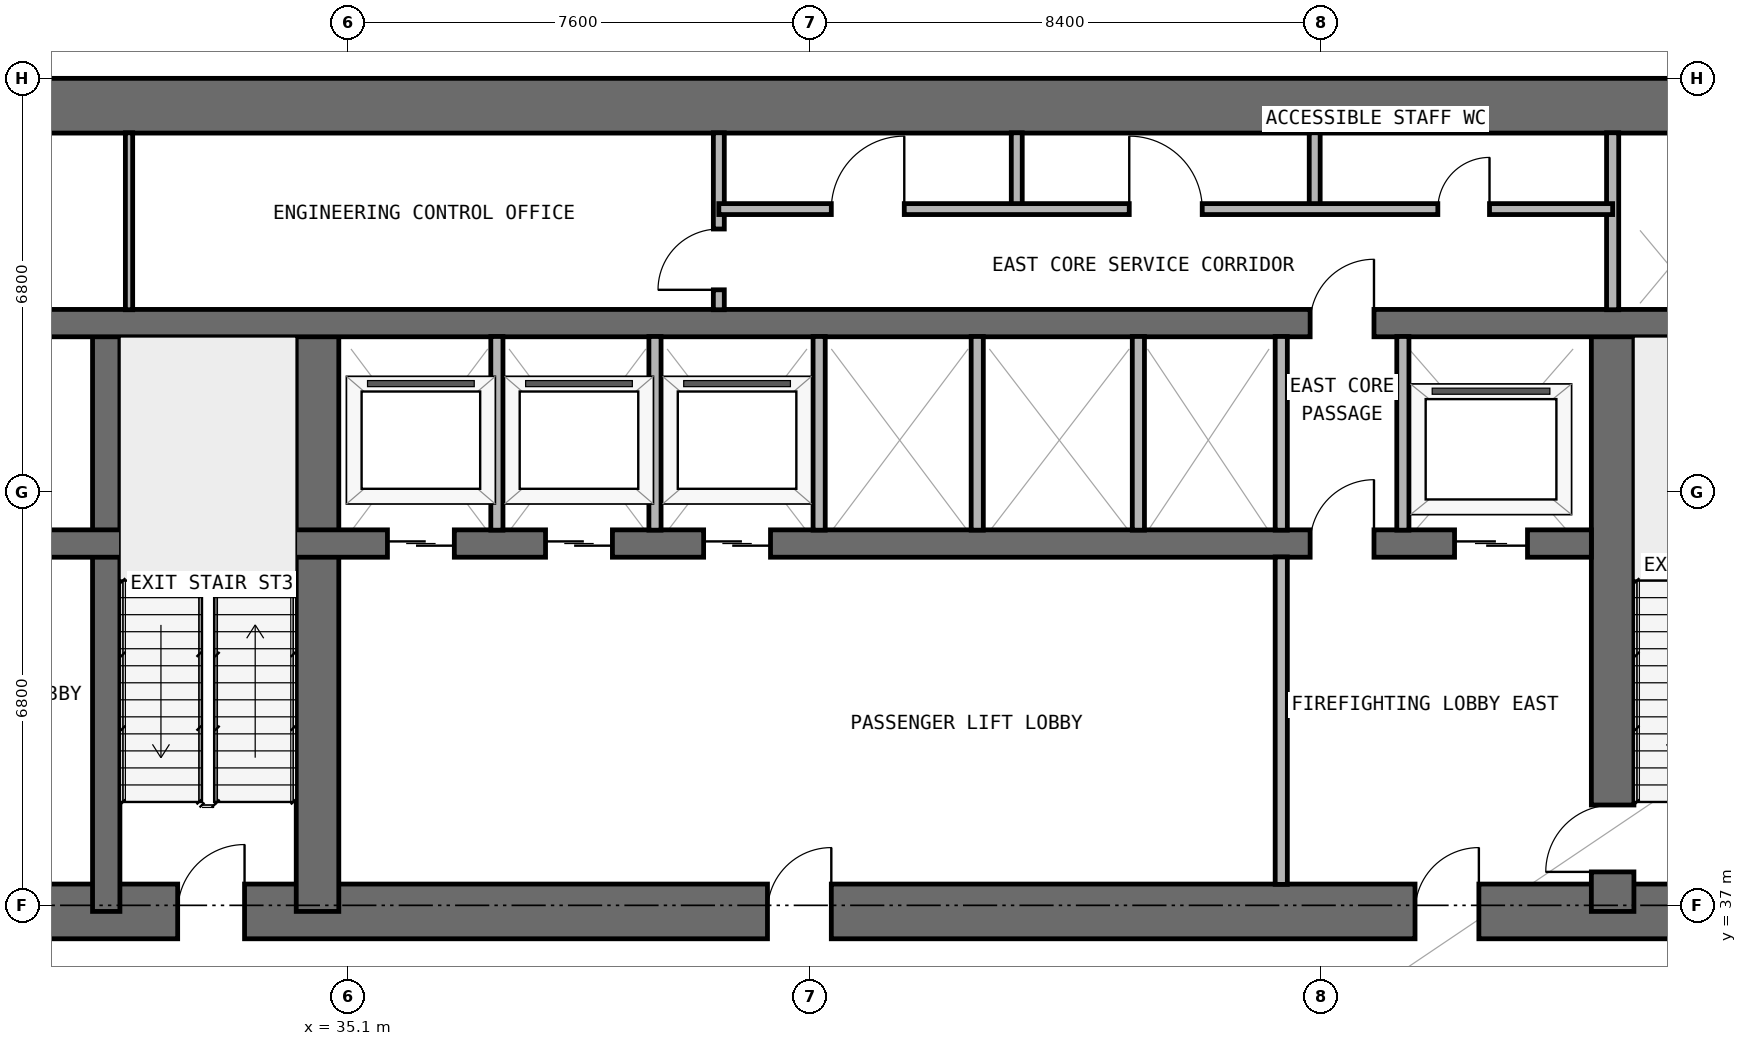
"""IFC4 building model, lengths in metres.
Left out: names, types, materials, properties, quantities, classifications, styles, units other than length and angle.
Written with IfcOpenShell. Run it as: python <this file> out.ifc"""

import sys

from ifc_helpers import new_model, si_unit, direction, frame, frame_2d, origin, place, context, subcontext, project, spatial, rectangle, extrude, element, fill, save


model = new_model("IFC4")
c1 = context("Model", 3, precision=1e-05, world=origin(), true_north=direction((0.0, 1.0)))
c2 = subcontext(c1, "Body", "Model", "MODEL_VIEW")
j1 = project(units=[si_unit("LENGTHUNIT", "METRE"), si_unit("PLANEANGLEUNIT", "RADIAN")], contexts=[c1])
p1 = place(None, origin())
s1 = spatial("IfcSite", under=j1, at=p1, CompositionType="ELEMENT")
p2 = place(p1, origin())
s2 = spatial("IfcBuilding", under=s1, at=p2, CompositionType="ELEMENT")
p3 = place(p2, frame((0.0, 0.0, 10.2)))
s3 = spatial("IfcBuildingStorey", under=s2, at=p3, CompositionType="ELEMENT", Elevation=10.2)
p4 = place(p3, frame((17.75, 36.9, 0.0), z_axis=(0.0, 0.0, 1.0), x_axis=(1.0, 0.0, 0.0)))
e1 = element("IfcWall", 1, at=p4, inside=s3, PredefinedType="SHEAR", context=c2, shape_type="SweptSolid", body=[
    extrude(rectangle(XDim=42.3, YDim=0.9, at=frame_2d((21.15, 0.0))), origin(), (0.0, 0.0, 1.0), 4.5),
])
p5 = place(p4, frame((14.55, 0.0, 0.0)))
e2 = element("IfcOpeningElement", 2, at=p5, cuts=e1, PredefinedType="OPENING", context=c2, shape_type="SweptSolid", body=[
    extrude(rectangle(XDim=1.1, YDim=2.15, at=frame_2d((0.55, 1.075))), frame((0.0, 0.46, 0.0), z_axis=(0.0, -1.0, 0.0), x_axis=(1.0, 0.0, 0.0)), (0.0, 0.0, 1.0), 0.92),
])
p6 = place(p4, frame((6.4, 0.0, 0.0)))
e3 = element("IfcOpeningElement", 3, at=p6, cuts=e1, PredefinedType="OPENING", context=c2, shape_type="SweptSolid", body=[
    extrude(rectangle(XDim=1.05, YDim=2.15, at=frame_2d((0.525, 1.075))), frame((0.0, 0.46, 0.0), z_axis=(0.0, -1.0, 0.0), x_axis=(1.0, 0.0, 0.0)), (0.0, 0.0, 1.0), 0.92),
])
p7 = place(p4, frame((34.9, 0.0, 0.0)))
e4 = element("IfcOpeningElement", 4, at=p7, cuts=e1, PredefinedType="OPENING", context=c2, shape_type="SweptSolid", body=[
    extrude(rectangle(XDim=1.05, YDim=2.15, at=frame_2d((0.525, 1.075))), frame((0.0, 0.46, 0.0), z_axis=(0.0, -1.0, 0.0), x_axis=(1.0, 0.0, 0.0)), (0.0, 0.0, 1.0), 0.92),
])
p8 = place(p4, frame((11.012, 0.0, 0.0)))
e5 = element("IfcOpeningElement", 5, at=p8, cuts=e1, PredefinedType="OPENING", context=c2, shape_type="SweptSolid", body=[
    extrude(rectangle(XDim=1.05, YDim=2.15, at=frame_2d((0.525, 1.075))), frame((0.0, 0.46, 0.0), z_axis=(0.0, -1.0, 0.0), x_axis=(1.0, 0.0, 0.0)), (0.0, 0.0, 1.0), 0.92),
])
p9 = place(p4, frame((24.25, 0.0, 0.0)))
e6 = element("IfcOpeningElement", 6, at=p9, cuts=e1, PredefinedType="OPENING", context=c2, shape_type="SweptSolid", body=[
    extrude(rectangle(XDim=1.05, YDim=2.15, at=frame_2d((0.525, 1.075))), frame((0.0, 0.46, 0.0), z_axis=(0.0, -1.0, 0.0), x_axis=(1.0, 0.0, 0.0)), (0.0, 0.0, 1.0), 0.92),
])
p10 = place(p3, frame((17.75, 50.15, 0.0), z_axis=(0.0, 0.0, 1.0), x_axis=(1.0, 0.0, 0.0)))
e7 = element("IfcWall", 7, at=p10, inside=s3, PredefinedType="SHEAR", context=c2, shape_type="SweptSolid", body=[
    extrude(rectangle(XDim=42.3, YDim=0.9, at=frame_2d((21.15, 0.0))), origin(), (0.0, 0.0, 1.0), 4.5),
])
p11 = place(p3, frame((55.9, 36.9, 0.0), z_axis=(0.0, 0.0, 1.0), x_axis=(0.0, 1.0, 0.0)))
e8 = element("IfcWall", 8, at=p11, inside=s3, PredefinedType="SHEAR", context=c2, shape_type="SweptSolid", body=[
    extrude(rectangle(XDim=9.675, YDim=0.7, at=frame_2d((4.837, 0.0))), origin(), (0.0, 0.0, 1.0), 4.5),
])
p12 = place(p11, frame((0.65, 0.0, 0.0)))
e9 = element("IfcOpeningElement", 9, at=p12, cuts=e8, PredefinedType="OPENING", context=c2, shape_type="SweptSolid", body=[
    extrude(rectangle(XDim=1.1, YDim=2.15, at=frame_2d((0.55, 1.075))), frame((0.0, 0.36, 0.0), z_axis=(0.0, -1.0, 0.0), x_axis=(1.0, 0.0, 0.0)), (0.0, 0.0, 1.0), 0.72),
])
p13 = place(p3, frame((31.125, 36.9, 0.0), z_axis=(0.0, 0.0, 1.0), x_axis=(0.0, 1.0, 0.0)))
e10 = element("IfcWall", 10, at=p13, inside=s3, PredefinedType="SHEAR", context=c2, shape_type="SweptSolid", body=[
    extrude(rectangle(XDim=9.675, YDim=0.45, at=frame_2d((4.837, 0.0))), origin(), (0.0, 0.0, 1.0), 4.5),
])
p14 = place(p3, frame((34.6, 36.9, 0.0), z_axis=(0.0, 0.0, 1.0), x_axis=(0.0, 1.0, 0.0)))
e11 = element("IfcWall", 11, at=p14, inside=s3, PredefinedType="SHEAR", context=c2, shape_type="SweptSolid", body=[
    extrude(rectangle(XDim=9.675, YDim=0.7, at=frame_2d((4.837, 0.0))), origin(), (0.0, 0.0, 1.0), 4.5),
])
p15 = place(p3, frame((22.25, 42.95, 0.0), z_axis=(0.0, 0.0, 1.0), x_axis=(1.0, 0.0, 0.0)))
e12 = element("IfcWall", 12, at=p15, inside=s3, PredefinedType="SHEAR", context=c2, shape_type="SweptSolid", body=[
    extrude(rectangle(XDim=33.3, YDim=0.45, at=frame_2d((16.65, 0.0))), origin(), (0.0, 0.0, 1.0), 4.5),
])
p16 = place(p15, frame((1.05, 0.0, 0.0)))
e13 = element("IfcOpeningElement", 13, at=p16, cuts=e12, PredefinedType="OPENING", context=c2, shape_type="SweptSolid", body=[
    extrude(rectangle(XDim=1.2, YDim=2.2, at=frame_2d((0.6, 1.1))), frame((0.0, 0.235, 0.0), z_axis=(0.0, -1.0, 0.0), x_axis=(1.0, 0.0, 0.0)), (0.0, 0.0, 1.0), 0.47),
])
p17 = place(p15, frame((31.05, 0.0, 0.0)))
e14 = element("IfcOpeningElement", 14, at=p17, cuts=e12, PredefinedType="OPENING", context=c2, shape_type="SweptSolid", body=[
    extrude(rectangle(XDim=1.2, YDim=2.2, at=frame_2d((0.6, 1.1))), frame((0.0, 0.235, 0.0), z_axis=(0.0, -1.0, 0.0), x_axis=(1.0, 0.0, 0.0)), (0.0, 0.0, 1.0), 0.47),
])
p18 = place(p15, frame((13.5, 0.0, 0.0)))
e15 = element("IfcOpeningElement", 15, at=p18, cuts=e12, PredefinedType="OPENING", context=c2, shape_type="SweptSolid", body=[
    extrude(rectangle(XDim=1.1, YDim=2.2, at=frame_2d((0.55, 1.1))), frame((0.0, 0.235, 0.0), z_axis=(0.0, -1.0, 0.0), x_axis=(1.0, 0.0, 0.0)), (0.0, 0.0, 1.0), 0.47),
])
p19 = place(p15, frame((16.1, 0.0, 0.0)))
e16 = element("IfcOpeningElement", 16, at=p19, cuts=e12, PredefinedType="OPENING", context=c2, shape_type="SweptSolid", body=[
    extrude(rectangle(XDim=1.1, YDim=2.2, at=frame_2d((0.55, 1.1))), frame((0.0, 0.235, 0.0), z_axis=(0.0, -1.0, 0.0), x_axis=(1.0, 0.0, 0.0)), (0.0, 0.0, 1.0), 0.47),
])
p20 = place(p15, frame((18.7, 0.0, 0.0)))
e17 = element("IfcOpeningElement", 17, at=p20, cuts=e12, PredefinedType="OPENING", context=c2, shape_type="SweptSolid", body=[
    extrude(rectangle(XDim=1.1, YDim=2.2, at=frame_2d((0.55, 1.1))), frame((0.0, 0.235, 0.0), z_axis=(0.0, -1.0, 0.0), x_axis=(1.0, 0.0, 0.0)), (0.0, 0.0, 1.0), 0.47),
])
p21 = place(p15, frame((3.625, 0.0, 0.0)))
e18 = element("IfcOpeningElement", 18, at=p21, cuts=e12, PredefinedType="OPENING", context=c2, shape_type="SweptSolid", body=[
    extrude(rectangle(XDim=1.05, YDim=2.15, at=frame_2d((0.525, 1.075))), frame((0.0, 0.235, 0.0), z_axis=(0.0, -1.0, 0.0), x_axis=(1.0, 0.0, 0.0)), (0.0, 0.0, 1.0), 0.47),
])
p22 = place(p15, frame((28.675, 0.0, 0.0)))
e19 = element("IfcOpeningElement", 19, at=p22, cuts=e12, PredefinedType="OPENING", context=c2, shape_type="SweptSolid", body=[
    extrude(rectangle(XDim=1.05, YDim=2.15, at=frame_2d((0.525, 1.075))), frame((0.0, 0.235, 0.0), z_axis=(0.0, -1.0, 0.0), x_axis=(1.0, 0.0, 0.0)), (0.0, 0.0, 1.0), 0.47),
])
p23 = place(p3, frame((18.2, 46.575, 0.0), z_axis=(0.0, 0.0, 1.0), x_axis=(1.0, 0.0, 0.0)))
e20 = element("IfcWall", 20, at=p23, inside=s3, PredefinedType="SHEAR", context=c2, shape_type="SweptSolid", body=[
    extrude(rectangle(XDim=41.4, YDim=0.45, at=frame_2d((20.7, 0.0))), origin(), (0.0, 0.0, 1.0), 4.5),
])
p24 = place(p23, frame((7.7, 0.0, 0.0)))
e21 = element("IfcOpeningElement", 21, at=p24, cuts=e20, PredefinedType="OPENING", context=c2, shape_type="SweptSolid", body=[
    extrude(rectangle(XDim=1.0, YDim=2.2, at=frame_2d((0.5, 1.1))), frame((0.0, 0.235, 0.0), z_axis=(0.0, -1.0, 0.0), x_axis=(1.0, 0.0, 0.0)), (0.0, 0.0, 1.0), 0.47),
])
p25 = place(p23, frame((32.725, 0.0, 0.0)))
e22 = element("IfcOpeningElement", 22, at=p25, cuts=e20, PredefinedType="OPENING", context=c2, shape_type="SweptSolid", body=[
    extrude(rectangle(XDim=1.05, YDim=2.15, at=frame_2d((0.525, 1.075))), frame((0.0, 0.235, 0.0), z_axis=(0.0, -1.0, 0.0), x_axis=(1.0, 0.0, 0.0)), (0.0, 0.0, 1.0), 0.47),
])
p26 = place(p3, frame((31.5, 46.795, 0.0), z_axis=(0.0, 0.0, 1.0), x_axis=(0.0, 1.0, 0.0)))
e23 = element("IfcWall", 23, at=p26, inside=s3, PredefinedType="PARTITIONING", context=c2, shape_type="SweptSolid", body=[
    extrude(rectangle(XDim=2.91, YDim=0.12, at=frame_2d((1.455, 0.0))), origin(), (0.0, 0.0, 1.0), 4.5),
])
for number, where, z_axis, x_axis in (
    (24, (37.55, 43.17, 0.0), (0.0, 0.0, 1.0), (0.0, 1.0, 0.0)),
    (25, (40.15, 43.17, 0.0), (0.0, 0.0, 1.0), (0.0, 1.0, 0.0)),
):
    element("IfcWall", number, at=place(p3, frame(where, z_axis=z_axis, x_axis=x_axis)), inside=s3, PredefinedType="PARTITIONING", context=c2, shape_type="SweptSolid", body=[
        extrude(rectangle(XDim=3.185, YDim=0.2, at=frame_2d((1.593, 0.0))), origin(), (0.0, 0.0, 1.0), 4.5),
    ])
p27 = place(p3, frame((41.2, 46.795, 0.0), z_axis=(0.0, 0.0, 1.0), x_axis=(0.0, 1.0, 0.0)))
e26 = element("IfcWall", 26, at=p27, inside=s3, PredefinedType="PARTITIONING", context=c2, shape_type="SweptSolid", body=[
    extrude(rectangle(XDim=2.91, YDim=0.18, at=frame_2d((1.455, 0.0))), origin(), (0.0, 0.0, 1.0), 4.5),
])
p28 = place(p27, frame((0.327, 0.0, 0.0)))
e27 = element("IfcOpeningElement", 27, at=p28, cuts=e26, PredefinedType="OPENING", context=c2, shape_type="SweptSolid", body=[
    extrude(rectangle(XDim=1.0, YDim=2.2, at=frame_2d((0.5, 1.1))), frame((0.0, 0.1, 0.0), z_axis=(0.0, -1.0, 0.0), x_axis=(1.0, 0.0, 0.0)), (0.0, 0.0, 1.0), 0.2),
])
for number, where, z_axis, x_axis in (
    (28, (42.85, 43.17, 0.0), (0.0, 0.0, 1.0), (0.0, 1.0, 0.0)),
    (29, (45.45, 43.17, 0.0), (0.0, 0.0, 1.0), (0.0, 1.0, 0.0)),
):
    element("IfcWall", number, at=place(p3, frame(where, z_axis=z_axis, x_axis=x_axis)), inside=s3, PredefinedType="PARTITIONING", context=c2, shape_type="SweptSolid", body=[
        extrude(rectangle(XDim=3.185, YDim=0.2, at=frame_2d((1.593, 0.0))), origin(), (0.0, 0.0, 1.0), 4.5),
    ])
p29 = place(p3, frame((46.1, 48.45, 0.0), z_axis=(0.0, 0.0, 1.0), x_axis=(0.0, 1.0, 0.0)))
e30 = element("IfcWall", 30, at=p29, inside=s3, PredefinedType="PARTITIONING", context=c2, shape_type="SweptSolid", body=[
    extrude(rectangle(XDim=1.255, YDim=0.18, at=frame_2d((0.627, 0.0))), origin(), (0.0, 0.0, 1.0), 4.5),
])
p30 = place(p3, frame((48.1, 43.17, 0.0), z_axis=(0.0, 0.0, 1.0), x_axis=(0.0, 1.0, 0.0)))
e31 = element("IfcWall", 31, at=p30, inside=s3, PredefinedType="PARTITIONING", context=c2, shape_type="SweptSolid", body=[
    extrude(rectangle(XDim=3.185, YDim=0.2, at=frame_2d((1.593, 0.0))), origin(), (0.0, 0.0, 1.0), 4.5),
])
p31 = place(p3, frame((50.45, 37.345, 0.0), z_axis=(0.0, 0.0, 1.0), x_axis=(0.0, 1.0, 0.0)))
e32 = element("IfcWall", 32, at=p31, inside=s3, PredefinedType="PARTITIONING", context=c2, shape_type="SweptSolid", body=[
    extrude(rectangle(XDim=5.385, YDim=0.2, at=frame_2d((2.692, 0.0))), origin(), (0.0, 0.0, 1.0), 4.5),
])
p32 = place(p3, frame((50.45, 43.17, 0.0), z_axis=(0.0, 0.0, 1.0), x_axis=(0.0, 1.0, 0.0)))
e33 = element("IfcWall", 33, at=p32, inside=s3, PredefinedType="PARTITIONING", context=c2, shape_type="SweptSolid", body=[
    extrude(rectangle(XDim=3.185, YDim=0.2, at=frame_2d((1.593, 0.0))), origin(), (0.0, 0.0, 1.0), 4.5),
])
p33 = place(p3, frame((51.0, 48.45, 0.0), z_axis=(0.0, 0.0, 1.0), x_axis=(0.0, 1.0, 0.0)))
e34 = element("IfcWall", 34, at=p33, inside=s3, PredefinedType="PARTITIONING", context=c2, shape_type="SweptSolid", body=[
    extrude(rectangle(XDim=1.255, YDim=0.18, at=frame_2d((0.627, 0.0))), origin(), (0.0, 0.0, 1.0), 4.5),
])
p34 = place(p3, frame((52.45, 43.17, 0.0), z_axis=(0.0, 0.0, 1.0), x_axis=(0.0, 1.0, 0.0)))
e35 = element("IfcWall", 35, at=p34, inside=s3, PredefinedType="PARTITIONING", context=c2, shape_type="SweptSolid", body=[
    extrude(rectangle(XDim=3.185, YDim=0.2, at=frame_2d((1.593, 0.0))), origin(), (0.0, 0.0, 1.0), 4.5),
])
p35 = place(p3, frame((55.9, 46.795, 0.0), z_axis=(0.0, 0.0, 1.0), x_axis=(0.0, 1.0, 0.0)))
e36 = element("IfcWall", 36, at=p35, inside=s3, PredefinedType="PARTITIONING", context=c2, shape_type="SweptSolid", body=[
    extrude(rectangle(XDim=2.91, YDim=0.2, at=frame_2d((1.455, 0.0))), origin(), (0.0, 0.0, 1.0), 4.5),
])
p36 = place(p3, frame((41.2, 48.45, 0.0), z_axis=(0.0, 0.0, 1.0), x_axis=(1.0, 0.0, 0.0)))
e37 = element("IfcWall", 37, at=p36, inside=s3, PredefinedType="PARTITIONING", context=c2, shape_type="SweptSolid", body=[
    extrude(rectangle(XDim=14.7, YDim=0.18, at=frame_2d((7.35, 0.0))), origin(), (0.0, 0.0, 1.0), 4.5),
])
p37 = place(p36, frame((1.85, 0.0, 0.0)))
e38 = element("IfcOpeningElement", 38, at=p37, cuts=e37, PredefinedType="OPENING", context=c2, shape_type="SweptSolid", body=[
    extrude(rectangle(XDim=1.2, YDim=2.2, at=frame_2d((0.6, 1.1))), frame((0.0, 0.1, 0.0), z_axis=(0.0, -1.0, 0.0), x_axis=(1.0, 0.0, 0.0)), (0.0, 0.0, 1.0), 0.2),
])
p38 = place(p36, frame((6.75, 0.0, 0.0)))
e39 = element("IfcOpeningElement", 39, at=p38, cuts=e37, PredefinedType="OPENING", context=c2, shape_type="SweptSolid", body=[
    extrude(rectangle(XDim=1.2, YDim=2.2, at=frame_2d((0.6, 1.1))), frame((0.0, 0.1, 0.0), z_axis=(0.0, -1.0, 0.0), x_axis=(1.0, 0.0, 0.0)), (0.0, 0.0, 1.0), 0.2),
])
p39 = place(p36, frame((11.825, 0.0, 0.0)))
e40 = element("IfcOpeningElement", 40, at=p39, cuts=e37, PredefinedType="OPENING", context=c2, shape_type="SweptSolid", body=[
    extrude(rectangle(XDim=0.85, YDim=2.1, at=frame_2d((0.425, 1.05))), frame((0.0, 0.1, 0.0), z_axis=(0.0, -1.0, 0.0), x_axis=(1.0, 0.0, 0.0)), (0.0, 0.0, 1.0), 0.2),
])
p40 = place(p17, origin())
e41 = element("IfcDoor", 41, at=p40, inside=s3, OperationType="DOUBLE_DOOR_SLIDING", PredefinedType="DOOR", context=c2, shape_type="SweptSolid", body=[
    extrude(rectangle(XDim=1.2, YDim=2.2, at=frame_2d((0.6, 1.1))), frame((0.0, 0.025, 0.0), z_axis=(0.0, -1.0, 0.0), x_axis=(1.0, 0.0, 0.0)), (0.0, 0.0, 1.0), 0.05),
])
fill(e14, e41)
p41 = place(p18, origin())
e42 = element("IfcDoor", 42, at=p41, inside=s3, OperationType="DOUBLE_DOOR_SLIDING", PredefinedType="DOOR", context=c2, shape_type="SweptSolid", body=[
    extrude(rectangle(XDim=1.1, YDim=2.2, at=frame_2d((0.55, 1.1))), frame((0.0, 0.025, 0.0), z_axis=(0.0, -1.0, 0.0), x_axis=(1.0, 0.0, 0.0)), (0.0, 0.0, 1.0), 0.05),
])
fill(e15, e42)
p42 = place(p19, origin())
e43 = element("IfcDoor", 43, at=p42, inside=s3, OperationType="DOUBLE_DOOR_SLIDING", PredefinedType="DOOR", context=c2, shape_type="SweptSolid", body=[
    extrude(rectangle(XDim=1.1, YDim=2.2, at=frame_2d((0.55, 1.1))), frame((0.0, 0.025, 0.0), z_axis=(0.0, -1.0, 0.0), x_axis=(1.0, 0.0, 0.0)), (0.0, 0.0, 1.0), 0.05),
])
fill(e16, e43)
p43 = place(p20, origin())
e44 = element("IfcDoor", 44, at=p43, inside=s3, OperationType="DOUBLE_DOOR_SLIDING", PredefinedType="DOOR", context=c2, shape_type="SweptSolid", body=[
    extrude(rectangle(XDim=1.1, YDim=2.2, at=frame_2d((0.55, 1.1))), frame((0.0, 0.025, 0.0), z_axis=(0.0, -1.0, 0.0), x_axis=(1.0, 0.0, 0.0)), (0.0, 0.0, 1.0), 0.05),
])
fill(e17, e44)
p44 = place(p5, origin())
e45 = element("IfcDoor", 45, at=p44, inside=s3, OperationType="SINGLE_SWING_RIGHT", PredefinedType="DOOR", context=c2, shape_type="SweptSolid", body=[
    extrude(rectangle(XDim=1.1, YDim=2.15, at=frame_2d((0.55, 1.075))), frame((0.0, 0.025, 0.0), z_axis=(0.0, -1.0, 0.0), x_axis=(1.0, 0.0, 0.0)), (0.0, 0.0, 1.0), 0.05),
])
fill(e2, e45)
p45 = place(p7, origin())
e46 = element("IfcDoor", 46, at=p45, inside=s3, OperationType="SINGLE_SWING_RIGHT", PredefinedType="DOOR", context=c2, shape_type="SweptSolid", body=[
    extrude(rectangle(XDim=1.05, YDim=2.15, at=frame_2d((0.525, 1.075))), frame((0.0, 0.025, 0.0), z_axis=(0.0, -1.0, 0.0), x_axis=(1.0, 0.0, 0.0)), (0.0, 0.0, 1.0), 0.05),
])
fill(e4, e46)
p46 = place(p12, origin())
e47 = element("IfcDoor", 47, at=p46, inside=s3, OperationType="SINGLE_SWING_LEFT", PredefinedType="DOOR", context=c2, shape_type="SweptSolid", body=[
    extrude(rectangle(XDim=1.1, YDim=2.15, at=frame_2d((0.55, 1.075))), frame((0.0, 0.025, 0.0), z_axis=(0.0, -1.0, 0.0), x_axis=(1.0, 0.0, 0.0)), (0.0, 0.0, 1.0), 0.05),
])
fill(e9, e47)
p47 = place(p22, origin())
e48 = element("IfcDoor", 48, at=p47, inside=s3, OperationType="SINGLE_SWING_RIGHT", PredefinedType="DOOR", context=c2, shape_type="SweptSolid", body=[
    extrude(rectangle(XDim=1.05, YDim=2.15, at=frame_2d((0.525, 1.075))), frame((0.0, 0.025, 0.0), z_axis=(0.0, -1.0, 0.0), x_axis=(1.0, 0.0, 0.0)), (0.0, 0.0, 1.0), 0.05),
])
fill(e19, e48)
p48 = place(p9, origin())
e49 = element("IfcDoor", 49, at=p48, inside=s3, OperationType="SINGLE_SWING_RIGHT", PredefinedType="DOOR", context=c2, shape_type="SweptSolid", body=[
    extrude(rectangle(XDim=1.05, YDim=2.15, at=frame_2d((0.525, 1.075))), frame((0.0, 0.025, 0.0), z_axis=(0.0, -1.0, 0.0), x_axis=(1.0, 0.0, 0.0)), (0.0, 0.0, 1.0), 0.05),
])
fill(e6, e49)
p49 = place(p25, origin())
e50 = element("IfcDoor", 50, at=p49, inside=s3, OperationType="SINGLE_SWING_RIGHT", PredefinedType="DOOR", context=c2, shape_type="SweptSolid", body=[
    extrude(rectangle(XDim=1.05, YDim=2.15, at=frame_2d((0.525, 1.075))), frame((0.0, 0.025, 0.0), z_axis=(0.0, -1.0, 0.0), x_axis=(1.0, 0.0, 0.0)), (0.0, 0.0, 1.0), 0.05),
])
fill(e22, e50)
p50 = place(p28, origin())
e51 = element("IfcDoor", 51, at=p50, inside=s3, OperationType="SINGLE_SWING_LEFT", PredefinedType="DOOR", context=c2, shape_type="SweptSolid", body=[
    extrude(rectangle(XDim=1.0, YDim=2.2, at=frame_2d((0.5, 1.1))), frame((0.0, 0.025, 0.0), z_axis=(0.0, -1.0, 0.0), x_axis=(1.0, 0.0, 0.0)), (0.0, 0.0, 1.0), 0.05),
])
fill(e27, e51)
p51 = place(p37, origin())
e52 = element("IfcDoor", 52, at=p51, inside=s3, OperationType="SINGLE_SWING_RIGHT", PredefinedType="DOOR", context=c2, shape_type="SweptSolid", body=[
    extrude(rectangle(XDim=1.2, YDim=2.2, at=frame_2d((0.6, 1.1))), frame((0.0, 0.025, 0.0), z_axis=(0.0, -1.0, 0.0), x_axis=(1.0, 0.0, 0.0)), (0.0, 0.0, 1.0), 0.05),
])
fill(e38, e52)
p52 = place(p38, origin())
e53 = element("IfcDoor", 53, at=p52, inside=s3, OperationType="SINGLE_SWING_LEFT", PredefinedType="DOOR", context=c2, shape_type="SweptSolid", body=[
    extrude(rectangle(XDim=1.2, YDim=2.2, at=frame_2d((0.6, 1.1))), frame((0.0, 0.025, 0.0), z_axis=(0.0, -1.0, 0.0), x_axis=(1.0, 0.0, 0.0)), (0.0, 0.0, 1.0), 0.05),
])
fill(e39, e53)
p53 = place(p39, origin())
e54 = element("IfcDoor", 54, at=p53, inside=s3, OperationType="SINGLE_SWING_RIGHT", PredefinedType="DOOR", context=c2, shape_type="SweptSolid", body=[
    extrude(rectangle(XDim=0.85, YDim=2.1, at=frame_2d((0.425, 1.05))), frame((0.0, 0.025, 0.0), z_axis=(0.0, -1.0, 0.0), x_axis=(1.0, 0.0, 0.0)), (0.0, 0.0, 1.0), 0.05),
])
fill(e40, e54)
save(model, sys.argv[1])
